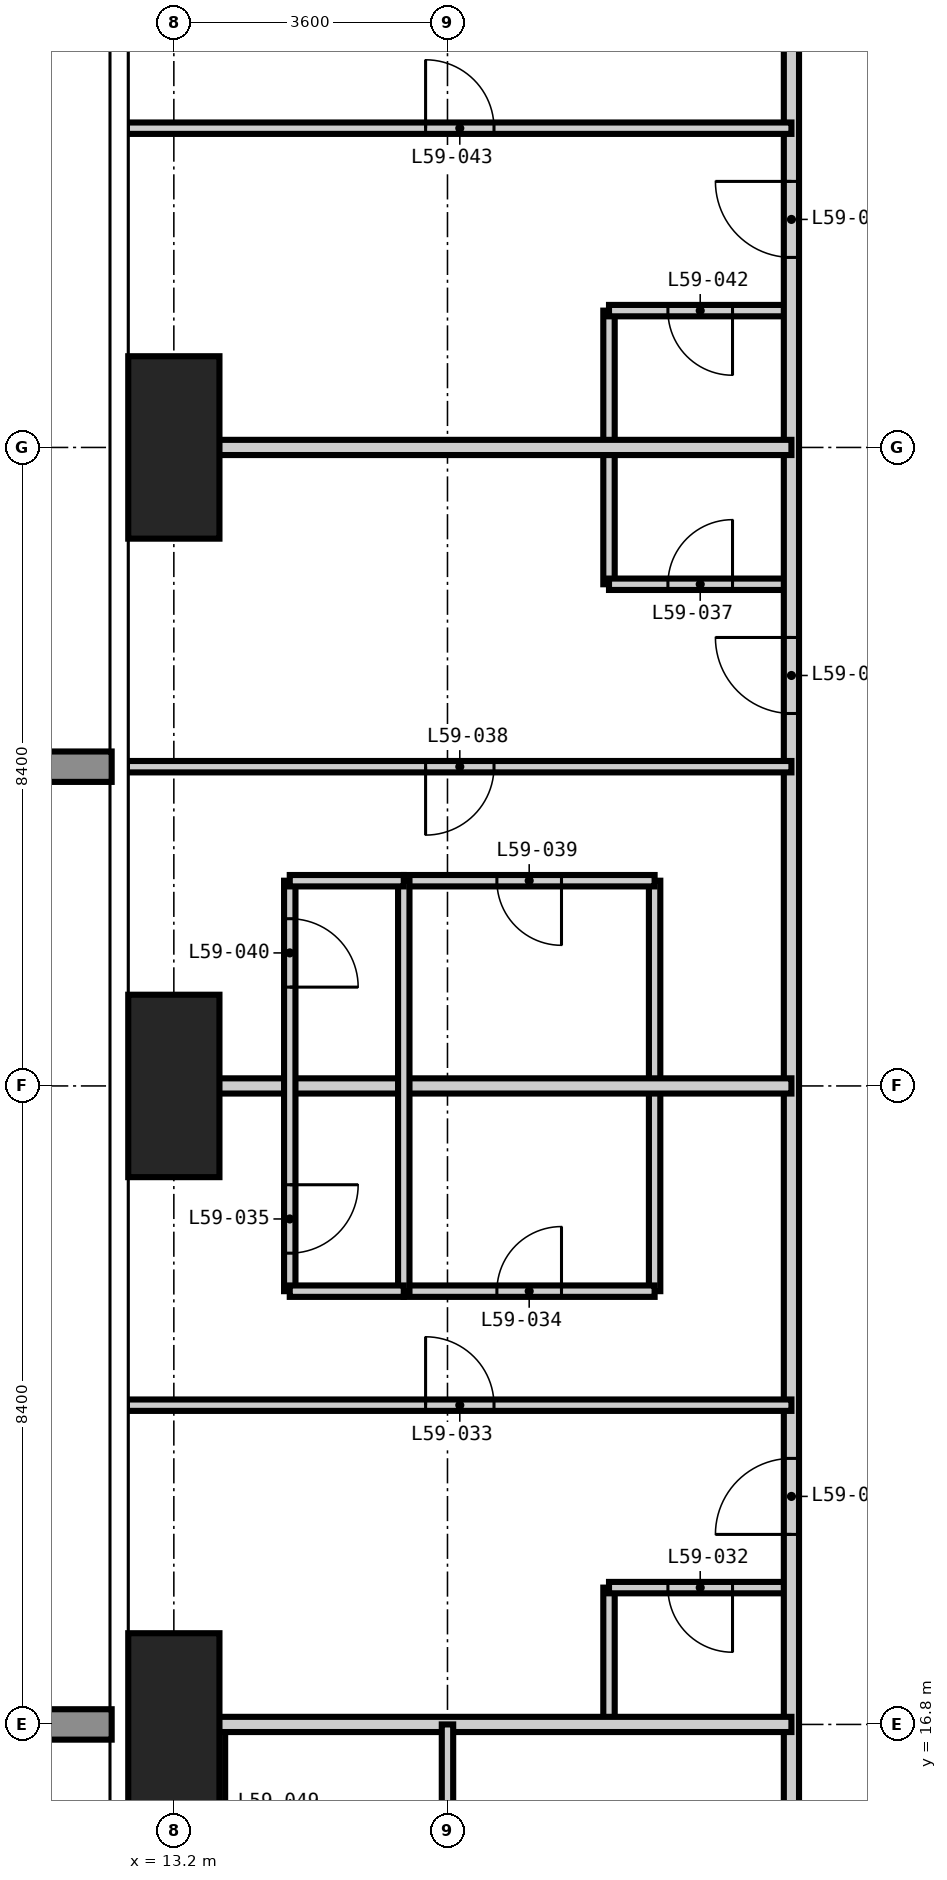
"""IFC4 building model, lengths in metres.
Left out: names, types, materials, properties, quantities, classifications, styles, units other than length and angle.
Written with IfcOpenShell. Run it as: python <this file> out.ifc"""

import sys

from ifc_helpers import new_model, si_unit, direction, frame, frame_2d, origin, origin_2d, place, context, subcontext, project, spatial, rectangle, extrude, element, fill, save


model = new_model("IFC4")
c1 = context("Model", 3, precision=1e-05, world=origin(), true_north=direction((0.0, 1.0)))
c2 = subcontext(c1, "Body", "Model", "MODEL_VIEW")
j1 = project(units=[si_unit("LENGTHUNIT", "METRE"), si_unit("PLANEANGLEUNIT", "RADIAN")], contexts=[c1])
p1 = place(None, origin())
s1 = spatial("IfcSite", under=j1, at=p1, CompositionType="ELEMENT")
p2 = place(p1, origin())
s2 = spatial("IfcBuilding", under=s1, at=p2, CompositionType="ELEMENT")
p3 = place(p2, frame((0.0, 0.0, 229.5)))
s3 = spatial("IfcBuildingStorey", under=s2, at=p3, CompositionType="ELEMENT", Elevation=229.5)
for number, where, z_axis, x_axis in (
    (1, (13.2, 16.8, -0.35), (0.0, 0.0, 1.0), (1.0, 0.0, 0.0)),
    (2, (13.2, 25.2, -0.35), (0.0, 0.0, 1.0), (1.0, 0.0, 0.0)),
    (3, (13.2, 33.6, -0.35), (0.0, 0.0, 1.0), (1.0, 0.0, 0.0)),
):
    element("IfcColumn", number, at=place(p3, frame(where, z_axis=z_axis, x_axis=x_axis)), inside=s3, PredefinedType="COLUMN", context=c2, shape_type="SweptSolid", body=[
        extrude(rectangle(XDim=1.2, YDim=2.4, at=origin_2d()), origin(), (0.0, 0.0, 1.0), 3.9),
    ])
p4 = place(p3, frame((13.8, 13.2, 0.0), z_axis=(0.0, 0.0, 1.0), x_axis=(0.0, 1.0, 0.0)))
e4 = element("IfcWall", 4, at=p4, inside=s3, PredefinedType="PARTITIONING", context=c2, shape_type="SweptSolid", body=[
    extrude(rectangle(XDim=3.6, YDim=0.15, at=frame_2d((1.8, 0.0))), origin(), (0.0, 0.0, 1.0), 3.55),
])
p5 = place(p4, frame((1.375, 0.0, 0.0)))
e5 = element("IfcOpeningElement", 5, at=p5, cuts=e4, PredefinedType="OPENING", context=c2, shape_type="SweptSolid", body=[
    extrude(rectangle(XDim=0.85, YDim=2.1, at=frame_2d((0.425, 1.05))), frame((0.0, 0.085, 0.0), z_axis=(0.0, -1.0, 0.0), x_axis=(1.0, 0.0, 0.0)), (0.0, 0.0, 1.0), 0.17),
])
p6 = place(p3, frame((18.925, 16.8, 0.0), z_axis=(0.0, 0.0, 1.0), x_axis=(0.0, 1.0, 0.0)))
e6 = element("IfcWall", 6, at=p6, inside=s3, PredefinedType="PARTITIONING", context=c2, shape_type="SweptSolid", body=[
    extrude(rectangle(XDim=1.8, YDim=0.15, at=frame_2d((0.9, 0.0))), origin(), (0.0, 0.0, 1.0), 3.55),
])
p7 = place(p3, frame((18.925, 31.8, 0.0), z_axis=(0.0, 0.0, 1.0), x_axis=(0.0, 1.0, 0.0)))
e7 = element("IfcWall", 7, at=p7, inside=s3, PredefinedType="PARTITIONING", context=c2, shape_type="SweptSolid", body=[
    extrude(rectangle(XDim=3.6, YDim=0.15, at=frame_2d((1.8, 0.0))), origin(), (0.0, 0.0, 1.0), 3.55),
])
p8 = place(p3, frame((19.525, 22.5, 0.0), z_axis=(0.0, 0.0, 1.0), x_axis=(0.0, 1.0, 0.0)))
e8 = element("IfcWall", 8, at=p8, inside=s3, PredefinedType="PARTITIONING", context=c2, shape_type="SweptSolid", body=[
    extrude(rectangle(XDim=5.4, YDim=0.15, at=frame_2d((2.7, 0.0))), origin(), (0.0, 0.0, 1.0), 3.55),
])
p9 = place(p3, frame((18.925, 18.6, 0.0), z_axis=(0.0, 0.0, 1.0), x_axis=(1.0, 0.0, 0.0)))
e9 = element("IfcWall", 9, at=p9, inside=s3, PredefinedType="PARTITIONING", context=c2, shape_type="SweptSolid", body=[
    extrude(rectangle(XDim=2.4, YDim=0.15, at=frame_2d((1.2, 0.0))), origin(), (0.0, 0.0, 1.0), 3.55),
])
p10 = place(p9, frame((0.775, 0.0, 0.0)))
e10 = element("IfcOpeningElement", 10, at=p10, cuts=e9, PredefinedType="OPENING", context=c2, shape_type="SweptSolid", body=[
    extrude(rectangle(XDim=0.85, YDim=2.1, at=frame_2d((0.425, 1.05))), frame((0.0, 0.085, 0.0), z_axis=(0.0, -1.0, 0.0), x_axis=(1.0, 0.0, 0.0)), (0.0, 0.0, 1.0), 0.17),
])
p11 = place(p3, frame((16.225, 22.5, 0.0), z_axis=(0.0, 0.0, 1.0), x_axis=(1.0, 0.0, 0.0)))
e11 = element("IfcWall", 11, at=p11, inside=s3, PredefinedType="PARTITIONING", context=c2, shape_type="SweptSolid", body=[
    extrude(rectangle(XDim=3.3, YDim=0.15, at=frame_2d((1.65, 0.0))), origin(), (0.0, 0.0, 1.0), 3.55),
])
p12 = place(p11, frame((1.225, 0.0, 0.0)))
e12 = element("IfcOpeningElement", 12, at=p12, cuts=e11, PredefinedType="OPENING", context=c2, shape_type="SweptSolid", body=[
    extrude(rectangle(XDim=0.85, YDim=2.1, at=frame_2d((0.425, 1.05))), frame((0.0, 0.085, 0.0), z_axis=(0.0, -1.0, 0.0), x_axis=(1.0, 0.0, 0.0)), (0.0, 0.0, 1.0), 0.17),
])
p13 = place(p3, frame((16.225, 27.9, 0.0), z_axis=(0.0, 0.0, 1.0), x_axis=(1.0, 0.0, 0.0)))
e13 = element("IfcWall", 13, at=p13, inside=s3, PredefinedType="PARTITIONING", context=c2, shape_type="SweptSolid", body=[
    extrude(rectangle(XDim=3.3, YDim=0.15, at=frame_2d((1.65, 0.0))), origin(), (0.0, 0.0, 1.0), 3.55),
])
p14 = place(p13, frame((1.225, 0.0, 0.0)))
e14 = element("IfcOpeningElement", 14, at=p14, cuts=e13, PredefinedType="OPENING", context=c2, shape_type="SweptSolid", body=[
    extrude(rectangle(XDim=0.85, YDim=2.1, at=frame_2d((0.425, 1.05))), frame((0.0, 0.085, 0.0), z_axis=(0.0, -1.0, 0.0), x_axis=(1.0, 0.0, 0.0)), (0.0, 0.0, 1.0), 0.17),
])
p15 = place(p3, frame((18.925, 31.8, 0.0), z_axis=(0.0, 0.0, 1.0), x_axis=(1.0, 0.0, 0.0)))
e15 = element("IfcWall", 15, at=p15, inside=s3, PredefinedType="PARTITIONING", context=c2, shape_type="SweptSolid", body=[
    extrude(rectangle(XDim=2.4, YDim=0.15, at=frame_2d((1.2, 0.0))), origin(), (0.0, 0.0, 1.0), 3.55),
])
p16 = place(p15, frame((0.775, 0.0, 0.0)))
e16 = element("IfcOpeningElement", 16, at=p16, cuts=e15, PredefinedType="OPENING", context=c2, shape_type="SweptSolid", body=[
    extrude(rectangle(XDim=0.85, YDim=2.1, at=frame_2d((0.425, 1.05))), frame((0.0, 0.085, 0.0), z_axis=(0.0, -1.0, 0.0), x_axis=(1.0, 0.0, 0.0)), (0.0, 0.0, 1.0), 0.17),
])
p17 = place(p3, frame((18.925, 35.4, 0.0), z_axis=(0.0, 0.0, 1.0), x_axis=(1.0, 0.0, 0.0)))
e17 = element("IfcWall", 17, at=p17, inside=s3, PredefinedType="PARTITIONING", context=c2, shape_type="SweptSolid", body=[
    extrude(rectangle(XDim=2.4, YDim=0.15, at=frame_2d((1.2, 0.0))), origin(), (0.0, 0.0, 1.0), 3.55),
])
p18 = place(p17, frame((0.775, 0.0, 0.0)))
e18 = element("IfcOpeningElement", 18, at=p18, cuts=e17, PredefinedType="OPENING", context=c2, shape_type="SweptSolid", body=[
    extrude(rectangle(XDim=0.85, YDim=2.1, at=frame_2d((0.425, 1.05))), frame((0.0, 0.085, 0.0), z_axis=(0.0, -1.0, 0.0), x_axis=(1.0, 0.0, 0.0)), (0.0, 0.0, 1.0), 0.17),
])
p19 = place(p3, frame((21.325, 13.15, 0.0), z_axis=(0.0, 0.0, 1.0), x_axis=(0.0, 1.0, 0.0)))
e19 = element("IfcWall", 19, at=p19, inside=s3, PredefinedType="PARTITIONING", context=c2, shape_type="SweptSolid", body=[
    extrude(rectangle(XDim=31.9, YDim=0.2, at=frame_2d((15.95, 0.0))), origin(), (0.0, 0.0, 1.0), 3.55),
])
p20 = place(p19, frame((6.15, 0.0, 0.0)))
e20 = element("IfcOpeningElement", 20, at=p20, cuts=e19, PredefinedType="OPENING", context=c2, shape_type="SweptSolid", body=[
    extrude(rectangle(XDim=1.0, YDim=2.2, at=frame_2d((0.5, 1.1))), frame((0.0, 0.11, 0.0), z_axis=(0.0, -1.0, 0.0), x_axis=(1.0, 0.0, 0.0)), (0.0, 0.0, 1.0), 0.22),
])
p21 = place(p19, frame((16.95, 0.0, 0.0)))
e21 = element("IfcOpeningElement", 21, at=p21, cuts=e19, PredefinedType="OPENING", context=c2, shape_type="SweptSolid", body=[
    extrude(rectangle(XDim=1.0, YDim=2.2, at=frame_2d((0.5, 1.1))), frame((0.0, 0.11, 0.0), z_axis=(0.0, -1.0, 0.0), x_axis=(1.0, 0.0, 0.0)), (0.0, 0.0, 1.0), 0.22),
])
p22 = place(p19, frame((22.95, 0.0, 0.0)))
e22 = element("IfcOpeningElement", 22, at=p22, cuts=e19, PredefinedType="OPENING", context=c2, shape_type="SweptSolid", body=[
    extrude(rectangle(XDim=1.0, YDim=2.2, at=frame_2d((0.5, 1.1))), frame((0.0, 0.11, 0.0), z_axis=(0.0, -1.0, 0.0), x_axis=(1.0, 0.0, 0.0)), (0.0, 0.0, 1.0), 0.22),
])
p23 = place(p19, frame((1.325, 0.0, 0.0)))
e23 = element("IfcOpeningElement", 23, at=p23, cuts=e19, PredefinedType="OPENING", context=c2, shape_type="SweptSolid", body=[
    extrude(rectangle(XDim=1.0, YDim=2.2, at=frame_2d((0.5, 1.1))), frame((0.0, 0.11, 0.0), z_axis=(0.0, -1.0, 0.0), x_axis=(1.0, 0.0, 0.0)), (0.0, 0.0, 1.0), 0.22),
])
p24 = place(p19, frame((29.875, 0.0, 0.0)))
e24 = element("IfcOpeningElement", 24, at=p24, cuts=e19, PredefinedType="OPENING", context=c2, shape_type="SweptSolid", body=[
    extrude(rectangle(XDim=1.0, YDim=2.2, at=frame_2d((0.5, 1.1))), frame((0.0, 0.11, 0.0), z_axis=(0.0, -1.0, 0.0), x_axis=(1.0, 0.0, 0.0)), (0.0, 0.0, 1.0), 0.22),
])
for number, where, z_axis, x_axis in (
    (25, (12.582, 16.8, 0.0), (0.0, 0.0, 1.0), (1.0, 0.0, 0.0)),
    (26, (12.582, 25.2, 0.0), (0.0, 0.0, 1.0), (1.0, 0.0, 0.0)),
    (27, (12.582, 33.6, 0.0), (0.0, 0.0, 1.0), (1.0, 0.0, 0.0)),
):
    element("IfcWall", number, at=place(p3, frame(where, z_axis=z_axis, x_axis=x_axis)), inside=s3, PredefinedType="PARTITIONING", context=c2, shape_type="SweptSolid", body=[
        extrude(rectangle(XDim=8.743, YDim=0.2, at=frame_2d((4.372, 0.0))), origin(), (0.0, 0.0, 1.0), 3.55),
    ])
p25 = place(p3, frame((14.725, 22.5, 0.0), z_axis=(0.0, 0.0, 1.0), x_axis=(0.0, 1.0, 0.0)))
e28 = element("IfcWall", 28, at=p25, inside=s3, PredefinedType="PARTITIONING", context=c2, shape_type="SweptSolid", body=[
    extrude(rectangle(XDim=5.4, YDim=0.15, at=frame_2d((2.7, 0.0))), origin(), (0.0, 0.0, 1.0), 3.55),
])
p26 = place(p25, frame((0.5, 0.0, 0.0)))
e29 = element("IfcOpeningElement", 29, at=p26, cuts=e28, PredefinedType="OPENING", context=c2, shape_type="SweptSolid", body=[
    extrude(rectangle(XDim=0.9, YDim=2.1, at=frame_2d((0.45, 1.05))), frame((0.0, 0.085, 0.0), z_axis=(0.0, -1.0, 0.0), x_axis=(1.0, 0.0, 0.0)), (0.0, 0.0, 1.0), 0.17),
])
p27 = place(p25, frame((4.0, 0.0, 0.0)))
e30 = element("IfcOpeningElement", 30, at=p27, cuts=e28, PredefinedType="OPENING", context=c2, shape_type="SweptSolid", body=[
    extrude(rectangle(XDim=0.9, YDim=2.1, at=frame_2d((0.45, 1.05))), frame((0.0, 0.085, 0.0), z_axis=(0.0, -1.0, 0.0), x_axis=(1.0, 0.0, 0.0)), (0.0, 0.0, 1.0), 0.17),
])
p28 = place(p3, frame((16.225, 22.5, 0.0), z_axis=(0.0, 0.0, 1.0), x_axis=(0.0, 1.0, 0.0)))
e31 = element("IfcWall", 31, at=p28, inside=s3, PredefinedType="PARTITIONING", context=c2, shape_type="SweptSolid", body=[
    extrude(rectangle(XDim=5.4, YDim=0.15, at=frame_2d((2.7, 0.0))), origin(), (0.0, 0.0, 1.0), 3.55),
])
p29 = place(p3, frame((16.8, 4.182, 0.0), z_axis=(0.0, 0.0, 1.0), x_axis=(0.0, 1.0, 0.0)))
e32 = element("IfcWall", 32, at=p29, inside=s3, PredefinedType="PARTITIONING", context=c2, shape_type="SweptSolid", body=[
    extrude(rectangle(XDim=12.618, YDim=0.15, at=frame_2d((6.309, 0.0))), origin(), (0.0, 0.0, 1.0), 3.55),
])
p30 = place(p29, frame((2.868, 0.0, 0.0)))
e33 = element("IfcOpeningElement", 33, at=p30, cuts=e32, PredefinedType="OPENING", context=c2, shape_type="SweptSolid", body=[
    extrude(rectangle(XDim=0.9, YDim=2.1, at=frame_2d((0.45, 1.05))), frame((0.0, 0.085, 0.0), z_axis=(0.0, -1.0, 0.0), x_axis=(1.0, 0.0, 0.0)), (0.0, 0.0, 1.0), 0.17),
])
p31 = place(p3, frame((12.582, 21.0, 0.0), z_axis=(0.0, 0.0, 1.0), x_axis=(1.0, 0.0, 0.0)))
e34 = element("IfcWall", 34, at=p31, inside=s3, PredefinedType="PARTITIONING", context=c2, shape_type="SweptSolid", body=[
    extrude(rectangle(XDim=8.743, YDim=0.15, at=frame_2d((4.372, 0.0))), origin(), (0.0, 0.0, 1.0), 3.55),
])
p32 = place(p31, frame((3.93, 0.0, 0.0)))
e35 = element("IfcOpeningElement", 35, at=p32, cuts=e34, PredefinedType="OPENING", context=c2, shape_type="SweptSolid", body=[
    extrude(rectangle(XDim=0.9, YDim=2.1, at=frame_2d((0.45, 1.05))), frame((0.0, 0.085, 0.0), z_axis=(0.0, -1.0, 0.0), x_axis=(1.0, 0.0, 0.0)), (0.0, 0.0, 1.0), 0.17),
])
for number, where, z_axis, x_axis in (
    (36, (14.725, 22.5, 0.0), (0.0, 0.0, 1.0), (1.0, 0.0, 0.0)),
    (37, (14.725, 27.9, 0.0), (0.0, 0.0, 1.0), (1.0, 0.0, 0.0)),
):
    element("IfcWall", number, at=place(p3, frame(where, z_axis=z_axis, x_axis=x_axis)), inside=s3, PredefinedType="PARTITIONING", context=c2, shape_type="SweptSolid", body=[
        extrude(rectangle(XDim=1.5, YDim=0.15, at=frame_2d((0.75, 0.0))), origin(), (0.0, 0.0, 1.0), 3.55),
    ])
p33 = place(p3, frame((12.582, 29.4, 0.0), z_axis=(0.0, 0.0, 1.0), x_axis=(1.0, 0.0, 0.0)))
e38 = element("IfcWall", 38, at=p33, inside=s3, PredefinedType="PARTITIONING", context=c2, shape_type="SweptSolid", body=[
    extrude(rectangle(XDim=8.743, YDim=0.15, at=frame_2d((4.372, 0.0))), origin(), (0.0, 0.0, 1.0), 3.55),
])
p34 = place(p33, frame((3.93, 0.0, 0.0)))
e39 = element("IfcOpeningElement", 39, at=p34, cuts=e38, PredefinedType="OPENING", context=c2, shape_type="SweptSolid", body=[
    extrude(rectangle(XDim=0.9, YDim=2.1, at=frame_2d((0.45, 1.05))), frame((0.0, 0.085, 0.0), z_axis=(0.0, -1.0, 0.0), x_axis=(1.0, 0.0, 0.0)), (0.0, 0.0, 1.0), 0.17),
])
p35 = place(p3, frame((12.582, 37.8, 0.0), z_axis=(0.0, 0.0, 1.0), x_axis=(1.0, 0.0, 0.0)))
e40 = element("IfcWall", 40, at=p35, inside=s3, PredefinedType="PARTITIONING", context=c2, shape_type="SweptSolid", body=[
    extrude(rectangle(XDim=8.743, YDim=0.15, at=frame_2d((4.372, 0.0))), origin(), (0.0, 0.0, 1.0), 3.55),
])
p36 = place(p35, frame((3.93, 0.0, 0.0)))
e41 = element("IfcOpeningElement", 41, at=p36, cuts=e40, PredefinedType="OPENING", context=c2, shape_type="SweptSolid", body=[
    extrude(rectangle(XDim=0.9, YDim=2.1, at=frame_2d((0.45, 1.05))), frame((0.0, 0.085, 0.0), z_axis=(0.0, -1.0, 0.0), x_axis=(1.0, 0.0, 0.0)), (0.0, 0.0, 1.0), 0.17),
])
p37 = place(p20, origin())
e42 = element("IfcDoor", 42, at=p37, inside=s3, OperationType="SINGLE_SWING_LEFT", PredefinedType="DOOR", context=c2, shape_type="SweptSolid", body=[
    extrude(rectangle(XDim=1.0, YDim=2.2, at=frame_2d((0.5, 1.1))), frame((0.0, 0.025, 0.0), z_axis=(0.0, -1.0, 0.0), x_axis=(1.0, 0.0, 0.0)), (0.0, 0.0, 1.0), 0.05),
])
fill(e20, e42)
p38 = place(p10, frame((0.85, 0.0, 0.0), z_axis=(0.0, 0.0, 1.0), x_axis=(-1.0, 0.0, 0.0)))
e43 = element("IfcDoor", 43, at=p38, inside=s3, OperationType="SINGLE_SWING_LEFT", PredefinedType="DOOR", context=c2, shape_type="SweptSolid", body=[
    extrude(rectangle(XDim=0.85, YDim=2.1, at=frame_2d((0.425, 1.05))), frame((0.0, 0.025, 0.0), z_axis=(0.0, -1.0, 0.0), x_axis=(1.0, 0.0, 0.0)), (0.0, 0.0, 1.0), 0.05),
])
fill(e10, e43)
p39 = place(p32, origin())
e44 = element("IfcDoor", 44, at=p39, inside=s3, OperationType="SINGLE_SWING_LEFT", PredefinedType="DOOR", context=c2, shape_type="SweptSolid", body=[
    extrude(rectangle(XDim=0.9, YDim=2.1, at=frame_2d((0.45, 1.05))), frame((0.0, 0.025, 0.0), z_axis=(0.0, -1.0, 0.0), x_axis=(1.0, 0.0, 0.0)), (0.0, 0.0, 1.0), 0.05),
])
fill(e35, e44)
p40 = place(p12, origin())
e45 = element("IfcDoor", 45, at=p40, inside=s3, OperationType="SINGLE_SWING_RIGHT", PredefinedType="DOOR", context=c2, shape_type="SweptSolid", body=[
    extrude(rectangle(XDim=0.85, YDim=2.1, at=frame_2d((0.425, 1.05))), frame((0.0, 0.025, 0.0), z_axis=(0.0, -1.0, 0.0), x_axis=(1.0, 0.0, 0.0)), (0.0, 0.0, 1.0), 0.05),
])
fill(e12, e45)
p41 = place(p26, frame((0.9, 0.0, 0.0), z_axis=(0.0, 0.0, 1.0), x_axis=(-1.0, 0.0, 0.0)))
e46 = element("IfcDoor", 46, at=p41, inside=s3, OperationType="SINGLE_SWING_LEFT", PredefinedType="DOOR", context=c2, shape_type="SweptSolid", body=[
    extrude(rectangle(XDim=0.9, YDim=2.1, at=frame_2d((0.45, 1.05))), frame((0.0, 0.025, 0.0), z_axis=(0.0, -1.0, 0.0), x_axis=(1.0, 0.0, 0.0)), (0.0, 0.0, 1.0), 0.05),
])
fill(e29, e46)
p42 = place(p21, origin())
e47 = element("IfcDoor", 47, at=p42, inside=s3, OperationType="SINGLE_SWING_RIGHT", PredefinedType="DOOR", context=c2, shape_type="SweptSolid", body=[
    extrude(rectangle(XDim=1.0, YDim=2.2, at=frame_2d((0.5, 1.1))), frame((0.0, 0.025, 0.0), z_axis=(0.0, -1.0, 0.0), x_axis=(1.0, 0.0, 0.0)), (0.0, 0.0, 1.0), 0.05),
])
fill(e21, e47)
p43 = place(p16, origin())
e48 = element("IfcDoor", 48, at=p43, inside=s3, OperationType="SINGLE_SWING_RIGHT", PredefinedType="DOOR", context=c2, shape_type="SweptSolid", body=[
    extrude(rectangle(XDim=0.85, YDim=2.1, at=frame_2d((0.425, 1.05))), frame((0.0, 0.025, 0.0), z_axis=(0.0, -1.0, 0.0), x_axis=(1.0, 0.0, 0.0)), (0.0, 0.0, 1.0), 0.05),
])
fill(e16, e48)
p44 = place(p34, frame((0.9, 0.0, 0.0), z_axis=(0.0, 0.0, 1.0), x_axis=(-1.0, 0.0, 0.0)))
e49 = element("IfcDoor", 49, at=p44, inside=s3, OperationType="SINGLE_SWING_RIGHT", PredefinedType="DOOR", context=c2, shape_type="SweptSolid", body=[
    extrude(rectangle(XDim=0.9, YDim=2.1, at=frame_2d((0.45, 1.05))), frame((0.0, 0.025, 0.0), z_axis=(0.0, -1.0, 0.0), x_axis=(1.0, 0.0, 0.0)), (0.0, 0.0, 1.0), 0.05),
])
fill(e39, e49)
p45 = place(p14, frame((0.85, 0.0, 0.0), z_axis=(0.0, 0.0, 1.0), x_axis=(-1.0, 0.0, 0.0)))
e50 = element("IfcDoor", 50, at=p45, inside=s3, OperationType="SINGLE_SWING_LEFT", PredefinedType="DOOR", context=c2, shape_type="SweptSolid", body=[
    extrude(rectangle(XDim=0.85, YDim=2.1, at=frame_2d((0.425, 1.05))), frame((0.0, 0.025, 0.0), z_axis=(0.0, -1.0, 0.0), x_axis=(1.0, 0.0, 0.0)), (0.0, 0.0, 1.0), 0.05),
])
fill(e14, e50)
p46 = place(p27, frame((0.9, 0.0, 0.0), z_axis=(0.0, 0.0, 1.0), x_axis=(-1.0, 0.0, 0.0)))
e51 = element("IfcDoor", 51, at=p46, inside=s3, OperationType="SINGLE_SWING_RIGHT", PredefinedType="DOOR", context=c2, shape_type="SweptSolid", body=[
    extrude(rectangle(XDim=0.9, YDim=2.1, at=frame_2d((0.45, 1.05))), frame((0.0, 0.025, 0.0), z_axis=(0.0, -1.0, 0.0), x_axis=(1.0, 0.0, 0.0)), (0.0, 0.0, 1.0), 0.05),
])
fill(e30, e51)
p47 = place(p22, origin())
e52 = element("IfcDoor", 52, at=p47, inside=s3, OperationType="SINGLE_SWING_RIGHT", PredefinedType="DOOR", context=c2, shape_type="SweptSolid", body=[
    extrude(rectangle(XDim=1.0, YDim=2.2, at=frame_2d((0.5, 1.1))), frame((0.0, 0.025, 0.0), z_axis=(0.0, -1.0, 0.0), x_axis=(1.0, 0.0, 0.0)), (0.0, 0.0, 1.0), 0.05),
])
fill(e22, e52)
p48 = place(p18, frame((0.85, 0.0, 0.0), z_axis=(0.0, 0.0, 1.0), x_axis=(-1.0, 0.0, 0.0)))
e53 = element("IfcDoor", 53, at=p48, inside=s3, OperationType="SINGLE_SWING_LEFT", PredefinedType="DOOR", context=c2, shape_type="SweptSolid", body=[
    extrude(rectangle(XDim=0.85, YDim=2.1, at=frame_2d((0.425, 1.05))), frame((0.0, 0.025, 0.0), z_axis=(0.0, -1.0, 0.0), x_axis=(1.0, 0.0, 0.0)), (0.0, 0.0, 1.0), 0.05),
])
fill(e18, e53)
p49 = place(p36, origin())
e54 = element("IfcDoor", 54, at=p49, inside=s3, OperationType="SINGLE_SWING_LEFT", PredefinedType="DOOR", context=c2, shape_type="SweptSolid", body=[
    extrude(rectangle(XDim=0.9, YDim=2.1, at=frame_2d((0.45, 1.05))), frame((0.0, 0.025, 0.0), z_axis=(0.0, -1.0, 0.0), x_axis=(1.0, 0.0, 0.0)), (0.0, 0.0, 1.0), 0.05),
])
fill(e41, e54)
save(model, sys.argv[1])
